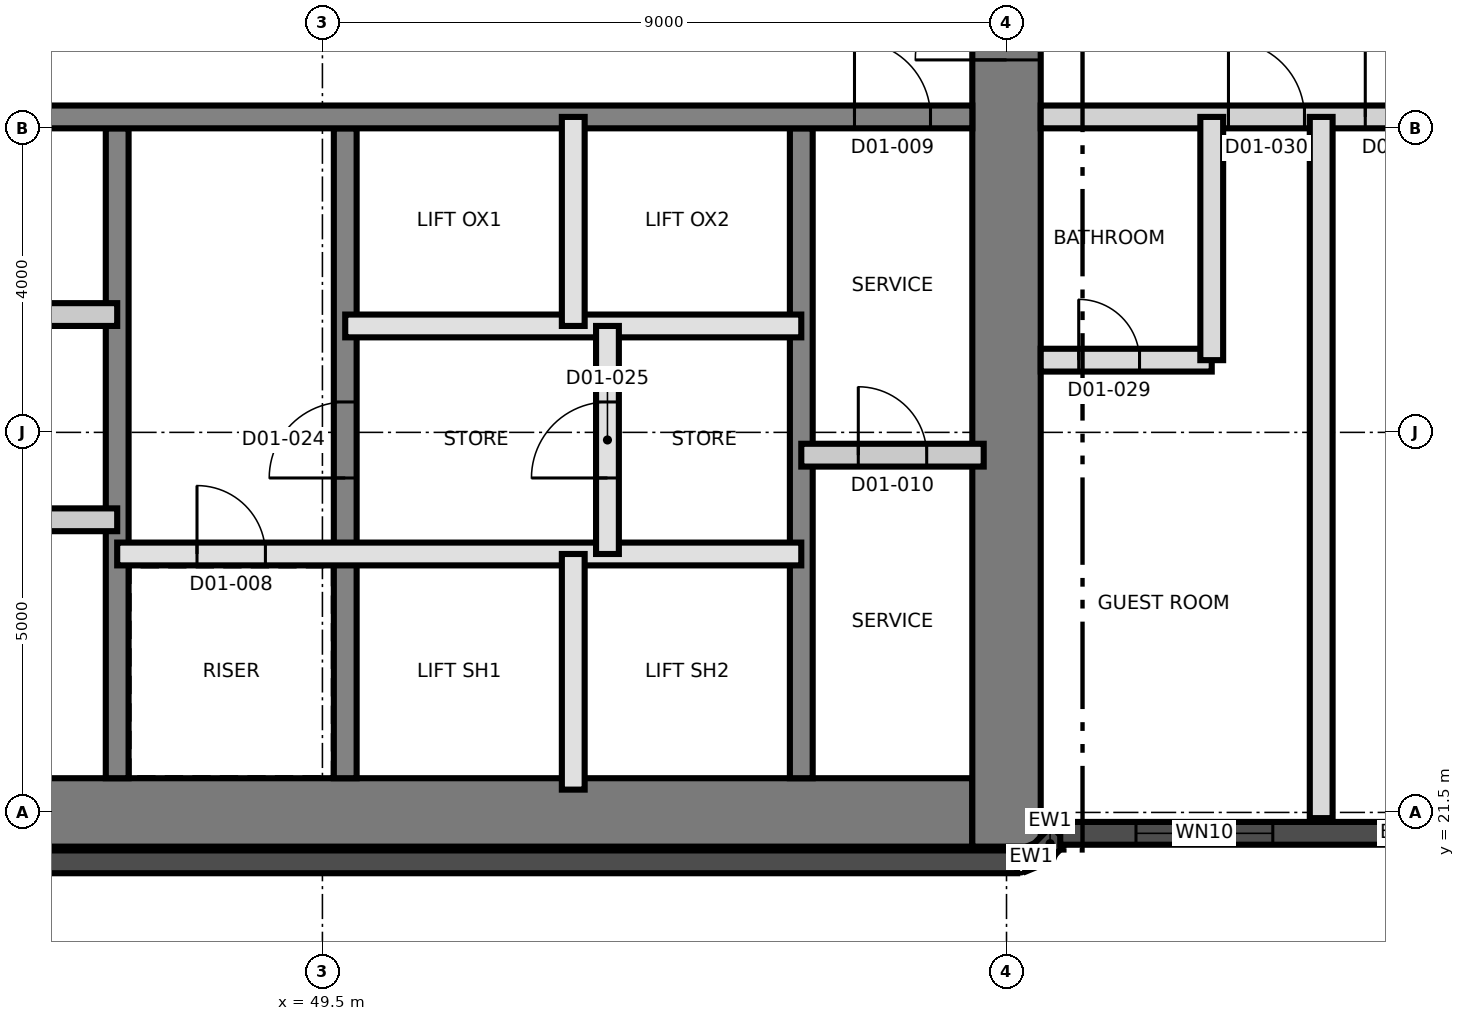
"""IFC4 building model, lengths in metres.
Left out: names, types, materials, properties, quantities, classifications, styles, units other than length and angle.
Written with IfcOpenShell. Run it as: python <this file> out.ifc"""

import sys

from ifc_helpers import new_model, si_unit, direction, frame, frame_2d, origin, place, context, subcontext, project, spatial, rectangle, extrude, element, fill, save


model = new_model("IFC4")
c1 = context("Model", 3, precision=1e-05, world=origin(), true_north=direction((0.0, 1.0)))
c2 = subcontext(c1, "Body", "Model", "MODEL_VIEW")
j1 = project(units=[si_unit("LENGTHUNIT", "METRE"), si_unit("PLANEANGLEUNIT", "RADIAN")], contexts=[c1])
p1 = place(None, origin())
s1 = spatial("IfcSite", under=j1, at=p1, CompositionType="ELEMENT")
p2 = place(p1, origin())
s2 = spatial("IfcBuilding", under=s1, at=p2, CompositionType="ELEMENT")
p3 = place(p2, frame((0.0, 0.0, 37.2)))
s3 = spatial("IfcBuildingStorey", under=s2, at=p3, CompositionType="ELEMENT", Elevation=37.2)
p4 = place(p3, frame((31.05, 21.5, 0.0), z_axis=(0.0, 0.0, 1.0), x_axis=(1.0, 0.0, 0.0)))
e1 = element("IfcWall", 1, at=p4, inside=s3, PredefinedType="SHEAR", context=c2, shape_type="SweptSolid", body=[
    extrude(rectangle(XDim=27.0, YDim=0.9, at=frame_2d((13.5, 0.0))), origin(), (0.0, 0.0, 1.0), 3.7),
])
p5 = place(p3, frame((58.5, 21.05, 0.0), z_axis=(0.0, 0.0, 1.0), x_axis=(0.0, 1.0, 0.0)))
e2 = element("IfcWall", 2, at=p5, inside=s3, PredefinedType="SHEAR", context=c2, shape_type="SweptSolid", body=[
    extrude(rectangle(XDim=18.9, YDim=0.9, at=frame_2d((9.45, 0.0))), origin(), (0.0, 0.0, 1.0), 3.7),
])
p6 = place(p5, frame((10.35, 0.0, 0.0)))
e3 = element("IfcOpeningElement", 3, at=p6, cuts=e2, PredefinedType="OPENING", context=c2, shape_type="SweptSolid", body=[
    extrude(rectangle(XDim=1.2, YDim=2.1, at=frame_2d((0.6, 1.05))), frame((0.0, 0.46, 0.0), z_axis=(0.0, -1.0, 0.0), x_axis=(1.0, 0.0, 0.0)), (0.0, 0.0, 1.0), 0.92),
])
p7 = place(p3, frame((46.8, 21.95, 0.0), z_axis=(0.0, 0.0, 1.0), x_axis=(0.0, 1.0, 0.0)))
e4 = element("IfcWall", 4, at=p7, inside=s3, PredefinedType="SHEAR", context=c2, shape_type="SweptSolid", body=[
    extrude(rectangle(XDim=8.55, YDim=0.3, at=frame_2d((4.275, 0.0))), origin(), (0.0, 0.0, 1.0), 3.7),
])
p8 = place(p3, frame((49.8, 21.95, 0.0), z_axis=(0.0, 0.0, 1.0), x_axis=(0.0, 1.0, 0.0)))
e5 = element("IfcWall", 5, at=p8, inside=s3, PredefinedType="SHEAR", context=c2, shape_type="SweptSolid", body=[
    extrude(rectangle(XDim=8.55, YDim=0.3, at=frame_2d((4.275, 0.0))), origin(), (0.0, 0.0, 1.0), 3.7),
])
p9 = place(p8, frame((3.95, 0.0, 0.0)))
e6 = element("IfcOpeningElement", 6, at=p9, cuts=e5, PredefinedType="OPENING", context=c2, shape_type="SweptSolid", body=[
    extrude(rectangle(XDim=1.0, YDim=2.1, at=frame_2d((0.5, 1.05))), frame((0.0, 0.16, 0.0), z_axis=(0.0, -1.0, 0.0), x_axis=(1.0, 0.0, 0.0)), (0.0, 0.0, 1.0), 0.32),
])
p10 = place(p3, frame((55.8, 21.95, 0.0), z_axis=(0.0, 0.0, 1.0), x_axis=(0.0, 1.0, 0.0)))
e7 = element("IfcWall", 7, at=p10, inside=s3, PredefinedType="SHEAR", context=c2, shape_type="SweptSolid", body=[
    extrude(rectangle(XDim=8.55, YDim=0.3, at=frame_2d((4.275, 0.0))), origin(), (0.0, 0.0, 1.0), 3.7),
])
p11 = place(p3, frame((31.95, 30.65, 0.0), z_axis=(0.0, 0.0, 1.0), x_axis=(1.0, 0.0, 0.0)))
e8 = element("IfcWall", 8, at=p11, inside=s3, PredefinedType="SHEAR", context=c2, shape_type="SweptSolid", body=[
    extrude(rectangle(XDim=26.1, YDim=0.3, at=frame_2d((13.05, 0.0))), origin(), (0.0, 0.0, 1.0), 3.7),
])
p12 = place(p11, frame((24.55, 0.0, 0.0)))
e9 = element("IfcOpeningElement", 9, at=p12, cuts=e8, PredefinedType="OPENING", context=c2, shape_type="SweptSolid", body=[
    extrude(rectangle(XDim=1.0, YDim=2.1, at=frame_2d((0.5, 1.05))), frame((0.0, 0.16, 0.0), z_axis=(0.0, -1.0, 0.0), x_axis=(1.0, 0.0, 0.0)), (0.0, 0.0, 1.0), 0.32),
])
p13 = place(p11, frame((11.35, 0.0, 0.0)))
e10 = element("IfcOpeningElement", 10, at=p13, cuts=e8, PredefinedType="OPENING", context=c2, shape_type="SweptSolid", body=[
    extrude(rectangle(XDim=1.0, YDim=2.1, at=frame_2d((0.5, 1.05))), frame((0.0, 0.16, 0.0), z_axis=(0.0, -1.0, 0.0), x_axis=(1.0, 0.0, 0.0)), (0.0, 0.0, 1.0), 0.32),
])
p14 = place(p3, frame((31.36, 20.85, 0.0), z_axis=(0.0, 0.0, 1.0), x_axis=(1.0, 0.0, 0.0)))
e11 = element("IfcWall", 11, at=p14, inside=s3, PredefinedType="SOLIDWALL", context=c2, shape_type="SweptSolid", body=[
    extrude(rectangle(XDim=27.281, YDim=0.3, at=frame_2d((13.64, 0.0))), origin(), (0.0, 0.0, 1.0), 3.4),
])
p15 = place(p3, frame((58.698, 20.861, 0.0), z_axis=(0.0, 0.0, 1.0), x_axis=(0.923757413239, 0.38297812142, 0.0)))
e12 = element("IfcWall", 12, at=p15, inside=s3, PredefinedType="SOLIDWALL", context=c2, shape_type="SweptSolid", body=[
    extrude(rectangle(XDim=0.275, YDim=0.3, at=frame_2d((0.138, 0.0))), origin(), (0.0, 0.0, 1.0), 3.4),
])
p16 = place(p3, frame((58.952, 20.967, 0.0), z_axis=(0.0, 0.0, 1.0), x_axis=(0.702144810536, 0.712034174065, 0.0)))
e13 = element("IfcWall", 13, at=p16, inside=s3, PredefinedType="SOLIDWALL", context=c2, shape_type="SweptSolid", body=[
    extrude(rectangle(XDim=0.346, YDim=0.3, at=frame_2d((0.173, 0.0))), origin(), (0.0, 0.0, 1.0), 3.4),
])
p17 = place(p3, frame((59.207, 21.225, 0.0), z_axis=(0.0, 0.0, 1.0), x_axis=(1.0, 0.0, 0.0)))
e14 = element("IfcWall", 14, at=p17, inside=s3, PredefinedType="SOLIDWALL", context=c2, shape_type="SweptSolid", body=[
    extrude(rectangle(XDim=8.993, YDim=0.3, at=frame_2d((4.497, 0.0))), origin(), (0.0, 0.0, 1.0), 3.4),
])
p18 = place(p17, frame((0.997, 0.0, 0.3)))
e15 = element("IfcOpeningElement", 15, at=p18, cuts=e14, PredefinedType="OPENING", context=c2, shape_type="SweptSolid", body=[
    extrude(rectangle(XDim=1.8, YDim=2.4, at=frame_2d((0.9, 1.2))), frame((0.0, 0.16, 0.0), z_axis=(0.0, -1.0, 0.0), x_axis=(1.0, 0.0, 0.0)), (0.0, 0.0, 1.0), 0.32),
])
p19 = place(p17, frame((5.443, 0.0, 0.9)))
e16 = element("IfcOpeningElement", 16, at=p19, cuts=e14, PredefinedType="OPENING", context=c2, shape_type="SweptSolid", body=[
    extrude(rectangle(XDim=1.2, YDim=1.5, at=frame_2d((0.6, 0.75))), frame((0.0, 0.16, 0.0), z_axis=(0.0, -1.0, 0.0), x_axis=(1.0, 0.0, 0.0)), (0.0, 0.0, 1.0), 0.32),
])
p20 = place(p3, frame((46.8, 24.9, 0.0), z_axis=(0.0, 0.0, 1.0), x_axis=(1.0, 0.0, 0.0)))
e17 = element("IfcWall", 17, at=p20, inside=s3, PredefinedType="SOLIDWALL", context=c2, shape_type="SweptSolid", body=[
    extrude(rectangle(XDim=9.0, YDim=0.3, at=frame_2d((4.5, 0.0))), origin(), (0.0, 0.0, 1.0), 3.4),
])
p21 = place(p20, frame((1.05, 0.0, 0.0)))
e18 = element("IfcOpeningElement", 18, at=p21, cuts=e17, PredefinedType="OPENING", context=c2, shape_type="SweptSolid", body=[
    extrude(rectangle(XDim=0.9, YDim=2.1, at=frame_2d((0.45, 1.05))), frame((0.0, 0.16, 0.0), z_axis=(0.0, -1.0, 0.0), x_axis=(1.0, 0.0, 0.0)), (0.0, 0.0, 1.0), 0.32),
])
p22 = place(p3, frame((40.8, 25.35, 0.0), z_axis=(0.0, 0.0, 1.0), x_axis=(1.0, 0.0, 0.0)))
e19 = element("IfcWall", 19, at=p22, inside=s3, PredefinedType="PARTITIONING", context=c2, shape_type="SweptSolid", body=[
    extrude(rectangle(XDim=6.0, YDim=0.3, at=frame_2d((3.0, 0.0))), origin(), (0.0, 0.0, 1.0), 3.4),
])
p23 = place(p22, frame((2.5, 0.0, 0.0)))
e20 = element("IfcOpeningElement", 20, at=p23, cuts=e19, PredefinedType="OPENING", context=c2, shape_type="SweptSolid", body=[
    extrude(rectangle(XDim=1.0, YDim=2.1, at=frame_2d((0.5, 1.05))), frame((0.0, 0.16, 0.0), z_axis=(0.0, -1.0, 0.0), x_axis=(1.0, 0.0, 0.0)), (0.0, 0.0, 1.0), 0.32),
])
p24 = place(p3, frame((55.8, 26.2, 0.0), z_axis=(0.0, 0.0, 1.0), x_axis=(1.0, 0.0, 0.0)))
e21 = element("IfcWall", 21, at=p24, inside=s3, PredefinedType="PARTITIONING", context=c2, shape_type="SweptSolid", body=[
    extrude(rectangle(XDim=2.4, YDim=0.3, at=frame_2d((1.2, 0.0))), origin(), (0.0, 0.0, 1.0), 3.4),
])
p25 = place(p24, frame((0.75, 0.0, 0.0)))
e22 = element("IfcOpeningElement", 22, at=p25, cuts=e21, PredefinedType="OPENING", context=c2, shape_type="SweptSolid", body=[
    extrude(rectangle(XDim=0.9, YDim=2.1, at=frame_2d((0.45, 1.05))), frame((0.0, 0.16, 0.0), z_axis=(0.0, -1.0, 0.0), x_axis=(1.0, 0.0, 0.0)), (0.0, 0.0, 1.0), 0.32),
])
p26 = place(p3, frame((49.8, 27.9, 0.0), z_axis=(0.0, 0.0, 1.0), x_axis=(1.0, 0.0, 0.0)))
e23 = element("IfcWall", 23, at=p26, inside=s3, PredefinedType="SOLIDWALL", context=c2, shape_type="SweptSolid", body=[
    extrude(rectangle(XDim=6.0, YDim=0.3, at=frame_2d((3.0, 0.0))), origin(), (0.0, 0.0, 1.0), 3.4),
])
p27 = place(p3, frame((40.8, 28.05, 0.0), z_axis=(0.0, 0.0, 1.0), x_axis=(1.0, 0.0, 0.0)))
e24 = element("IfcWall", 24, at=p27, inside=s3, PredefinedType="PARTITIONING", context=c2, shape_type="SweptSolid", body=[
    extrude(rectangle(XDim=6.0, YDim=0.3, at=frame_2d((3.0, 0.0))), origin(), (0.0, 0.0, 1.0), 3.4),
])
p28 = place(p3, frame((52.8, 21.8, 0.0), z_axis=(0.0, 0.0, 1.0), x_axis=(0.0, 1.0, 0.0)))
e25 = element("IfcWall", 25, at=p28, inside=s3, PredefinedType="SOLIDWALL", context=c2, shape_type="SweptSolid", body=[
    extrude(rectangle(XDim=3.1, YDim=0.3, at=frame_2d((1.55, 0.0))), origin(), (0.0, 0.0, 1.0), 3.4),
])
p29 = place(p3, frame((52.8, 27.9, 0.0), z_axis=(0.0, 0.0, 1.0), x_axis=(0.0, 1.0, 0.0)))
e26 = element("IfcWall", 26, at=p29, inside=s3, PredefinedType="SOLIDWALL", context=c2, shape_type="SweptSolid", body=[
    extrude(rectangle(XDim=2.75, YDim=0.3, at=frame_2d((1.375, 0.0))), origin(), (0.0, 0.0, 1.0), 3.4),
])
p30 = place(p3, frame((53.25, 24.9, 0.0), z_axis=(0.0, 0.0, 1.0), x_axis=(0.0, 1.0, 0.0)))
e27 = element("IfcWall", 27, at=p30, inside=s3, PredefinedType="SOLIDWALL", context=c2, shape_type="SweptSolid", body=[
    extrude(rectangle(XDim=3.0, YDim=0.3, at=frame_2d((1.5, 0.0))), origin(), (0.0, 0.0, 1.0), 3.4),
])
p31 = place(p30, frame((1.0, 0.0, 0.0)))
e28 = element("IfcOpeningElement", 28, at=p31, cuts=e27, PredefinedType="OPENING", context=c2, shape_type="SweptSolid", body=[
    extrude(rectangle(XDim=1.0, YDim=2.1, at=frame_2d((0.5, 1.05))), frame((0.0, 0.16, 0.0), z_axis=(0.0, -1.0, 0.0), x_axis=(1.0, 0.0, 0.0)), (0.0, 0.0, 1.0), 0.32),
])
p32 = place(p3, frame((58.95, 27.45, 0.0), z_axis=(0.0, 0.0, 1.0), x_axis=(1.0, 0.0, 0.0)))
e29 = element("IfcWall", 29, at=p32, inside=s3, PredefinedType="PARTITIONING", context=c2, shape_type="SweptSolid", body=[
    extrude(rectangle(XDim=2.25, YDim=0.3, at=frame_2d((1.125, 0.0))), origin(), (0.0, 0.0, 1.0), 3.4),
])
p33 = place(p32, frame((0.5, 0.0, 0.0)))
e30 = element("IfcOpeningElement", 30, at=p33, cuts=e29, PredefinedType="OPENING", context=c2, shape_type="SweptSolid", body=[
    extrude(rectangle(XDim=0.8, YDim=2.1, at=frame_2d((0.4, 1.05))), frame((0.0, 0.16, 0.0), z_axis=(0.0, -1.0, 0.0), x_axis=(1.0, 0.0, 0.0)), (0.0, 0.0, 1.0), 0.32),
])
p34 = place(p3, frame((58.95, 30.65, 0.0), z_axis=(0.0, 0.0, 1.0), x_axis=(1.0, 0.0, 0.0)))
e31 = element("IfcWall", 31, at=p34, inside=s3, PredefinedType="PARTITIONING", context=c2, shape_type="SweptSolid", body=[
    extrude(rectangle(XDim=26.38, YDim=0.3, at=frame_2d((13.19, 0.0))), origin(), (0.0, 0.0, 1.0), 3.4),
])
p35 = place(p34, frame((2.47, 0.0, 0.0)))
e32 = element("IfcOpeningElement", 32, at=p35, cuts=e31, PredefinedType="OPENING", context=c2, shape_type="SweptSolid", body=[
    extrude(rectangle(XDim=1.0, YDim=2.1, at=frame_2d((0.5, 1.05))), frame((0.0, 0.16, 0.0), z_axis=(0.0, -1.0, 0.0), x_axis=(1.0, 0.0, 0.0)), (0.0, 0.0, 1.0), 0.32),
])
p36 = place(p34, frame((4.27, 0.0, 0.0)))
e33 = element("IfcOpeningElement", 33, at=p36, cuts=e31, PredefinedType="OPENING", context=c2, shape_type="SweptSolid", body=[
    extrude(rectangle(XDim=1.0, YDim=2.1, at=frame_2d((0.5, 1.05))), frame((0.0, 0.16, 0.0), z_axis=(0.0, -1.0, 0.0), x_axis=(1.0, 0.0, 0.0)), (0.0, 0.0, 1.0), 0.32),
])
p37 = place(p34, frame((11.8, 0.0, 0.0)))
e34 = element("IfcOpeningElement", 34, at=p37, cuts=e31, PredefinedType="OPENING", context=c2, shape_type="SweptSolid", body=[
    extrude(rectangle(XDim=1.0, YDim=2.4, at=frame_2d((0.5, 1.2))), frame((0.0, 0.16, 0.0), z_axis=(0.0, -1.0, 0.0), x_axis=(1.0, 0.0, 0.0)), (0.0, 0.0, 1.0), 0.32),
])
p38 = place(p34, frame((13.3, 0.0, 0.0)))
e35 = element("IfcOpeningElement", 35, at=p38, cuts=e31, PredefinedType="OPENING", context=c2, shape_type="SweptSolid", body=[
    extrude(rectangle(XDim=1.0, YDim=2.4, at=frame_2d((0.5, 1.2))), frame((0.0, 0.16, 0.0), z_axis=(0.0, -1.0, 0.0), x_axis=(1.0, 0.0, 0.0)), (0.0, 0.0, 1.0), 0.32),
])
p39 = place(p34, frame((18.685, 0.0, 0.0)))
e36 = element("IfcOpeningElement", 36, at=p39, cuts=e31, PredefinedType="OPENING", context=c2, shape_type="SweptSolid", body=[
    extrude(rectangle(XDim=1.2, YDim=2.1, at=frame_2d((0.6, 1.05))), frame((0.0, 0.16, 0.0), z_axis=(0.0, -1.0, 0.0), x_axis=(1.0, 0.0, 0.0)), (0.0, 0.0, 1.0), 0.32),
])
p40 = place(p34, frame((21.935, 0.0, 0.0)))
e37 = element("IfcOpeningElement", 37, at=p40, cuts=e31, PredefinedType="OPENING", context=c2, shape_type="SweptSolid", body=[
    extrude(rectangle(XDim=1.0, YDim=2.1, at=frame_2d((0.5, 1.05))), frame((0.0, 0.16, 0.0), z_axis=(0.0, -1.0, 0.0), x_axis=(1.0, 0.0, 0.0)), (0.0, 0.0, 1.0), 0.32),
])
p41 = place(p3, frame((61.2, 27.45, 0.0), z_axis=(0.0, 0.0, 1.0), x_axis=(0.0, 1.0, 0.0)))
e38 = element("IfcWall", 38, at=p41, inside=s3, PredefinedType="PARTITIONING", context=c2, shape_type="SweptSolid", body=[
    extrude(rectangle(XDim=3.2, YDim=0.3, at=frame_2d((1.6, 0.0))), origin(), (0.0, 0.0, 1.0), 3.4),
])
p42 = place(p3, frame((62.64, 21.425, 0.0), z_axis=(0.0, 0.0, 1.0), x_axis=(0.0, 1.0, 0.0)))
e39 = element("IfcWall", 39, at=p42, inside=s3, PredefinedType="PARTITIONING", context=c2, shape_type="SweptSolid", body=[
    extrude(rectangle(XDim=9.225, YDim=0.3, at=frame_2d((4.612, 0.0))), origin(), (0.0, 0.0, 1.0), 3.4),
])
p43 = place(p18, origin())
e40 = element("IfcWindow", 40, at=p43, inside=s3, PartitioningType="SINGLE_PANEL", PredefinedType="WINDOW", context=c2, shape_type="SweptSolid", body=[
    extrude(rectangle(XDim=1.8, YDim=2.4, at=frame_2d((0.9, 1.2))), frame((0.0, 0.03, 0.0), z_axis=(0.0, -1.0, 0.0), x_axis=(1.0, 0.0, 0.0)), (0.0, 0.0, 1.0), 0.06),
])
fill(e15, e40)
p44 = place(p21, origin())
e41 = element("IfcDoor", 41, at=p44, inside=s3, OperationType="SINGLE_SWING_RIGHT", PredefinedType="DOOR", context=c2, shape_type="SweptSolid", body=[
    extrude(rectangle(XDim=0.9, YDim=2.1, at=frame_2d((0.45, 1.05))), frame((0.0, 0.025, 0.0), z_axis=(0.0, -1.0, 0.0), x_axis=(1.0, 0.0, 0.0)), (0.0, 0.0, 1.0), 0.05),
])
fill(e18, e41)
p45 = place(p12, origin())
e42 = element("IfcDoor", 42, at=p45, inside=s3, OperationType="SINGLE_SWING_LEFT", PredefinedType="DOOR", context=c2, shape_type="SweptSolid", body=[
    extrude(rectangle(XDim=1.0, YDim=2.1, at=frame_2d((0.5, 1.05))), frame((0.0, 0.025, 0.0), z_axis=(0.0, -1.0, 0.0), x_axis=(1.0, 0.0, 0.0)), (0.0, 0.0, 1.0), 0.05),
])
fill(e9, e42)
p46 = place(p25, origin())
e43 = element("IfcDoor", 43, at=p46, inside=s3, OperationType="SINGLE_SWING_RIGHT", PredefinedType="DOOR", context=c2, shape_type="SweptSolid", body=[
    extrude(rectangle(XDim=0.9, YDim=2.1, at=frame_2d((0.45, 1.05))), frame((0.0, 0.025, 0.0), z_axis=(0.0, -1.0, 0.0), x_axis=(1.0, 0.0, 0.0)), (0.0, 0.0, 1.0), 0.05),
])
fill(e22, e43)
p47 = place(p6, origin())
e44 = element("IfcDoor", 44, at=p47, inside=s3, OperationType="SINGLE_SWING_LEFT", PredefinedType="DOOR", context=c2, shape_type="SweptSolid", body=[
    extrude(rectangle(XDim=1.2, YDim=2.1, at=frame_2d((0.6, 1.05))), frame((0.0, 0.025, 0.0), z_axis=(0.0, -1.0, 0.0), x_axis=(1.0, 0.0, 0.0)), (0.0, 0.0, 1.0), 0.05),
])
fill(e3, e44)
p48 = place(p9, origin())
e45 = element("IfcDoor", 45, at=p48, inside=s3, OperationType="SINGLE_SWING_RIGHT", PredefinedType="DOOR", context=c2, shape_type="SweptSolid", body=[
    extrude(rectangle(XDim=1.0, YDim=2.1, at=frame_2d((0.5, 1.05))), frame((0.0, 0.025, 0.0), z_axis=(0.0, -1.0, 0.0), x_axis=(1.0, 0.0, 0.0)), (0.0, 0.0, 1.0), 0.05),
])
fill(e6, e45)
p49 = place(p31, origin())
e46 = element("IfcDoor", 46, at=p49, inside=s3, OperationType="SINGLE_SWING_RIGHT", PredefinedType="DOOR", context=c2, shape_type="SweptSolid", body=[
    extrude(rectangle(XDim=1.0, YDim=2.1, at=frame_2d((0.5, 1.05))), frame((0.0, 0.025, 0.0), z_axis=(0.0, -1.0, 0.0), x_axis=(1.0, 0.0, 0.0)), (0.0, 0.0, 1.0), 0.05),
])
fill(e28, e46)
p50 = place(p33, origin())
e47 = element("IfcDoor", 47, at=p50, inside=s3, OperationType="SINGLE_SWING_LEFT", PredefinedType="DOOR", context=c2, shape_type="SweptSolid", body=[
    extrude(rectangle(XDim=0.8, YDim=2.1, at=frame_2d((0.4, 1.05))), frame((0.0, 0.025, 0.0), z_axis=(0.0, -1.0, 0.0), x_axis=(1.0, 0.0, 0.0)), (0.0, 0.0, 1.0), 0.05),
])
fill(e30, e47)
p51 = place(p35, origin())
e48 = element("IfcDoor", 48, at=p51, inside=s3, OperationType="SINGLE_SWING_RIGHT", PredefinedType="DOOR", context=c2, shape_type="SweptSolid", body=[
    extrude(rectangle(XDim=1.0, YDim=2.1, at=frame_2d((0.5, 1.05))), frame((0.0, 0.025, 0.0), z_axis=(0.0, -1.0, 0.0), x_axis=(1.0, 0.0, 0.0)), (0.0, 0.0, 1.0), 0.05),
])
fill(e32, e48)
p52 = place(p36, origin())
e49 = element("IfcDoor", 49, at=p52, inside=s3, OperationType="SINGLE_SWING_LEFT", PredefinedType="DOOR", context=c2, shape_type="SweptSolid", body=[
    extrude(rectangle(XDim=1.0, YDim=2.1, at=frame_2d((0.5, 1.05))), frame((0.0, 0.025, 0.0), z_axis=(0.0, -1.0, 0.0), x_axis=(1.0, 0.0, 0.0)), (0.0, 0.0, 1.0), 0.05),
])
fill(e33, e49)
save(model, sys.argv[1])
